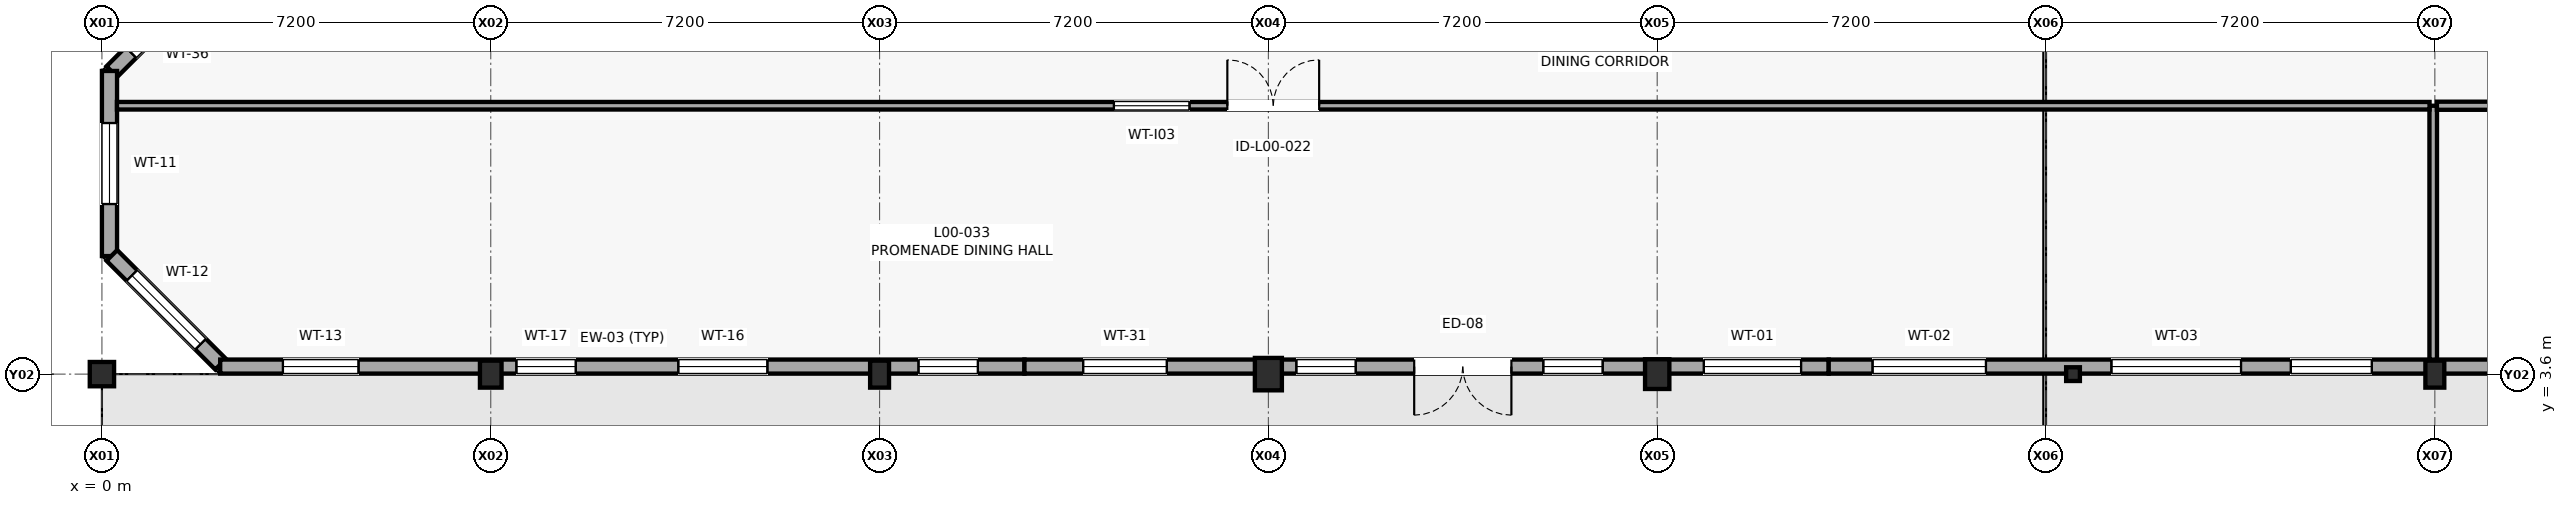
"""IFC4 building model, lengths in metres.
Left out: names, types, materials, properties, quantities, classifications, styles, units other than length and angle.
Written with IfcOpenShell. Run it as: python <this file> out.ifc"""

import sys

from ifc_helpers import new_model, si_unit, direction, frame, frame_2d, origin, origin_2d, place, context, subcontext, project, spatial, rectangle, i_section, extrude, element, fill, save


model = new_model("IFC4")
c1 = context("Model", 3, precision=1e-05, world=origin(), true_north=direction((0.0, 1.0)))
c2 = subcontext(c1, "Body", "Model", "MODEL_VIEW")
j1 = project(units=[si_unit("LENGTHUNIT", "METRE"), si_unit("PLANEANGLEUNIT", "RADIAN")], contexts=[c1])
p1 = place(None, origin())
s1 = spatial("IfcSite", under=j1, at=p1, CompositionType="ELEMENT")
p2 = place(p1, origin())
s2 = spatial("IfcBuilding", under=s1, at=p2, CompositionType="ELEMENT")
p3 = place(p2, origin())
s3 = spatial("IfcBuildingStorey", under=s2, at=p3, CompositionType="ELEMENT", Elevation=0.0)
p4 = place(p3, frame((0.0, 3.6, 0.0), z_axis=(0.0, 0.0, 1.0), x_axis=(1.0, 0.0, 0.0)))
e1 = element("IfcColumn", 1, at=p4, inside=s3, PredefinedType="COLUMN", context=c2, shape_type="SweptSolid", body=[
    extrude(rectangle(XDim=0.45, YDim=0.45, at=origin_2d()), origin(), (0.0, 0.0, 1.0), 4.2),
])
p5 = place(p3, frame((7.2, 3.6, 0.0), z_axis=(0.0, 0.0, 1.0), x_axis=(1.0, 0.0, 0.0)))
e2 = element("IfcColumn", 2, at=p5, inside=s3, PredefinedType="PILASTER", context=c2, shape_type="SweptSolid", body=[
    extrude(rectangle(XDim=0.4, YDim=0.5, at=origin_2d()), origin(), (0.0, 0.0, 1.0), 4.2),
])
p6 = place(p3, frame((14.4, 3.6, 0.0), z_axis=(0.0, 0.0, 1.0), x_axis=(1.0, 0.0, 0.0)))
e3 = element("IfcColumn", 3, at=p6, inside=s3, PredefinedType="PILASTER", context=c2, shape_type="SweptSolid", body=[
    extrude(rectangle(XDim=0.35, YDim=0.5, at=origin_2d()), origin(), (0.0, 0.0, 1.0), 4.2),
])
p7 = place(p3, frame((21.6, 3.6, 0.0), z_axis=(0.0, 0.0, 1.0), x_axis=(1.0, 0.0, 0.0)))
e4 = element("IfcColumn", 4, at=p7, inside=s3, PredefinedType="PILASTER", context=c2, shape_type="SweptSolid", body=[
    extrude(rectangle(XDim=0.5, YDim=0.6, at=origin_2d()), origin(), (0.0, 0.0, 1.0), 4.2),
])
p8 = place(p3, frame((28.8, 3.6, 0.0), z_axis=(0.0, 0.0, 1.0), x_axis=(1.0, 0.0, 0.0)))
e5 = element("IfcColumn", 5, at=p8, inside=s3, PredefinedType="PILASTER", context=c2, shape_type="SweptSolid", body=[
    extrude(rectangle(XDim=0.45, YDim=0.55, at=origin_2d()), origin(), (0.0, 0.0, 1.0), 4.2),
])
p9 = place(p3, frame((36.5, 3.6, 0.0), z_axis=(0.0, 0.0, 1.0), x_axis=(1.0, 0.0, 0.0)))
e6 = element("IfcColumn", 6, at=p9, inside=s3, PredefinedType="COLUMN", context=c2, shape_type="SweptSolid", body=[
    extrude(i_section(OverallWidth=0.255, OverallDepth=0.254, WebThickness=0.009, FlangeThickness=0.014, FilletRadius=0.013, at=origin_2d()), origin(), (0.0, 0.0, 1.0), 4.2),
])
p10 = place(p3, frame((43.2, 3.6, 0.0), z_axis=(0.0, 0.0, 1.0), x_axis=(1.0, 0.0, 0.0)))
e7 = element("IfcColumn", 7, at=p10, inside=s3, PredefinedType="PILASTER", context=c2, shape_type="SweptSolid", body=[
    extrude(rectangle(XDim=0.35, YDim=0.5, at=origin_2d()), origin(), (0.0, 0.0, 1.0), 4.2),
])
p11 = place(p3, frame((2.198, 11.216, 0.0), z_axis=(0.0, 0.0, 1.0), x_axis=(-0.707063922334, -0.707149637442, 0.0)))
e8 = element("IfcWall", 8, at=p11, inside=s3, PredefinedType="SOLIDWALL", context=c2, shape_type="SweptSolid", body=[
    extrude(rectangle(XDim=2.848, YDim=0.28, at=frame_2d((1.424, 0.0))), origin(), (0.0, 0.0, 1.0), 3.98),
])
p12 = place(p11, frame((0.499, 0.0, 1.05)))
e9 = element("IfcOpeningElement", 9, at=p12, cuts=e8, PredefinedType="OPENING", context=c2, shape_type="SweptSolid", body=[
    extrude(rectangle(XDim=1.85, YDim=1.4, at=frame_2d((0.925, 0.7))), frame((0.0, 0.15, 0.0), z_axis=(0.0, -1.0, 0.0), x_axis=(1.0, 0.0, 0.0)), (0.0, 0.0, 1.0), 0.3),
])
p13 = place(p3, frame((0.14, 9.214, 0.0), z_axis=(0.0, 0.0, 1.0), x_axis=(0.0, -1.0, 0.0)))
e10 = element("IfcWall", 10, at=p13, inside=s3, PredefinedType="SOLIDWALL", context=c2, shape_type="SweptSolid", body=[
    extrude(rectangle(XDim=3.428, YDim=0.28, at=frame_2d((1.714, 0.0))), origin(), (0.0, 0.0, 1.0), 3.98),
])
p14 = place(p13, frame((0.964, 0.0, 0.75)))
e11 = element("IfcOpeningElement", 11, at=p14, cuts=e10, PredefinedType="OPENING", context=c2, shape_type="SweptSolid", body=[
    extrude(rectangle(XDim=1.5, YDim=2.2, at=frame_2d((0.75, 1.1))), frame((0.0, 0.15, 0.0), z_axis=(0.0, -1.0, 0.0), x_axis=(1.0, 0.0, 0.0)), (0.0, 0.0, 1.0), 0.3),
])
p15 = place(p3, frame((0.184, 5.798, 0.0), z_axis=(0.0, 0.0, 1.0), x_axis=(0.707063922334, -0.707149637442, 0.0)))
e12 = element("IfcWall", 12, at=p15, inside=s3, PredefinedType="SOLIDWALL", context=c2, shape_type="SweptSolid", body=[
    extrude(rectangle(XDim=2.848, YDim=0.28, at=frame_2d((1.424, 0.0))), origin(), (0.0, 0.0, 1.0), 3.98),
])
p16 = place(p15, frame((0.524, 0.0, 0.75)))
e13 = element("IfcOpeningElement", 13, at=p16, cuts=e12, PredefinedType="OPENING", context=c2, shape_type="SweptSolid", body=[
    extrude(rectangle(XDim=1.8, YDim=2.25, at=frame_2d((0.9, 1.125))), frame((0.0, 0.15, 0.0), z_axis=(0.0, -1.0, 0.0), x_axis=(1.0, 0.0, 0.0)), (0.0, 0.0, 1.0), 0.3),
])
p17 = place(p3, frame((2.19, 3.74, 0.0), z_axis=(0.0, 0.0, 1.0), x_axis=(1.0, 0.0, 0.0)))
e14 = element("IfcWall", 14, at=p17, inside=s3, PredefinedType="SOLIDWALL", context=c2, shape_type="SweptSolid", body=[
    extrude(rectangle(XDim=14.893, YDim=0.26, at=frame_2d((7.447, 0.0))), origin(), (0.0, 0.0, 1.0), 3.205),
])
p18 = place(p17, frame((1.162, 0.0, 0.665)))
e15 = element("IfcOpeningElement", 15, at=p18, cuts=e14, PredefinedType="OPENING", context=c2, shape_type="SweptSolid", body=[
    extrude(rectangle(XDim=1.4, YDim=2.4, at=frame_2d((0.7, 1.2))), frame((0.0, 0.14, 0.0), z_axis=(0.0, -1.0, 0.0), x_axis=(1.0, 0.0, 0.0)), (0.0, 0.0, 1.0), 0.28),
])
p19 = place(p17, frame((5.485, 0.0, 0.75)))
e16 = element("IfcOpeningElement", 16, at=p19, cuts=e14, PredefinedType="OPENING", context=c2, shape_type="SweptSolid", body=[
    extrude(rectangle(XDim=1.1, YDim=2.1, at=frame_2d((0.55, 1.05))), frame((0.0, 0.14, 0.0), z_axis=(0.0, -1.0, 0.0), x_axis=(1.0, 0.0, 0.0)), (0.0, 0.0, 1.0), 0.28),
])
p20 = place(p17, frame((8.483, 0.0, 0.85)))
e17 = element("IfcOpeningElement", 17, at=p20, cuts=e14, PredefinedType="OPENING", context=c2, shape_type="SweptSolid", body=[
    extrude(rectangle(XDim=1.65, YDim=1.95, at=frame_2d((0.825, 0.975))), frame((0.0, 0.14, 0.0), z_axis=(0.0, -1.0, 0.0), x_axis=(1.0, 0.0, 0.0)), (0.0, 0.0, 1.0), 0.28),
])
p21 = place(p17, frame((12.931, 0.0, 0.75)))
e18 = element("IfcOpeningElement", 18, at=p21, cuts=e14, PredefinedType="OPENING", context=c2, shape_type="SweptSolid", body=[
    extrude(rectangle(XDim=1.1, YDim=2.1, at=frame_2d((0.55, 1.05))), frame((0.0, 0.14, 0.0), z_axis=(0.0, -1.0, 0.0), x_axis=(1.0, 0.0, 0.0)), (0.0, 0.0, 1.0), 0.28),
])
p22 = place(p3, frame((17.083, 3.74, 0.0), z_axis=(0.0, 0.0, 1.0), x_axis=(1.0, 0.0, 0.0)))
e19 = element("IfcWall", 19, at=p22, inside=s3, PredefinedType="SOLIDWALL", context=c2, shape_type="SweptSolid", body=[
    extrude(rectangle(XDim=14.893, YDim=0.26, at=frame_2d((7.447, 0.0))), origin(), (0.0, 0.0, 1.0), 3.205),
])
p23 = place(p22, frame((7.217, 0.0, 0.0)))
e20 = element("IfcOpeningElement", 20, at=p23, cuts=e19, PredefinedType="OPENING", context=c2, shape_type="SweptSolid", body=[
    extrude(rectangle(XDim=1.8, YDim=2.25, at=frame_2d((0.9, 1.125))), frame((0.0, 0.14, 0.0), z_axis=(0.0, -1.0, 0.0), x_axis=(1.0, 0.0, 0.0)), (0.0, 0.0, 1.0), 0.28),
])
p24 = place(p22, frame((1.087, 0.0, 0.85)))
e21 = element("IfcOpeningElement", 21, at=p24, cuts=e19, PredefinedType="OPENING", context=c2, shape_type="SweptSolid", body=[
    extrude(rectangle(XDim=1.55, YDim=1.85, at=frame_2d((0.775, 0.925))), frame((0.0, 0.14, 0.0), z_axis=(0.0, -1.0, 0.0), x_axis=(1.0, 0.0, 0.0)), (0.0, 0.0, 1.0), 0.28),
])
p25 = place(p22, frame((5.035, 0.0, 0.75)))
e22 = element("IfcOpeningElement", 22, at=p25, cuts=e19, PredefinedType="OPENING", context=c2, shape_type="SweptSolid", body=[
    extrude(rectangle(XDim=1.1, YDim=2.1, at=frame_2d((0.55, 1.05))), frame((0.0, 0.14, 0.0), z_axis=(0.0, -1.0, 0.0), x_axis=(1.0, 0.0, 0.0)), (0.0, 0.0, 1.0), 0.28),
])
p26 = place(p22, frame((9.608, 0.0, 0.75)))
e23 = element("IfcOpeningElement", 23, at=p26, cuts=e19, PredefinedType="OPENING", context=c2, shape_type="SweptSolid", body=[
    extrude(rectangle(XDim=1.1, YDim=2.1, at=frame_2d((0.55, 1.05))), frame((0.0, 0.14, 0.0), z_axis=(0.0, -1.0, 0.0), x_axis=(1.0, 0.0, 0.0)), (0.0, 0.0, 1.0), 0.28),
])
p27 = place(p22, frame((12.581, 0.0, 0.85)))
e24 = element("IfcOpeningElement", 24, at=p27, cuts=e19, PredefinedType="OPENING", context=c2, shape_type="SweptSolid", body=[
    extrude(rectangle(XDim=1.8, YDim=1.8, at=frame_2d((0.9, 0.9))), frame((0.0, 0.14, 0.0), z_axis=(0.0, -1.0, 0.0), x_axis=(1.0, 0.0, 0.0)), (0.0, 0.0, 1.0), 0.28),
])
p28 = place(p3, frame((31.976, 3.74, 0.0), z_axis=(0.0, 0.0, 1.0), x_axis=(1.0, 0.0, 0.0)))
e25 = element("IfcWall", 25, at=p28, inside=s3, PredefinedType="SOLIDWALL", context=c2, shape_type="SweptSolid", body=[
    extrude(rectangle(XDim=14.893, YDim=0.26, at=frame_2d((7.446, 0.0))), origin(), (0.0, 0.0, 1.0), 3.105),
])
p29 = place(p28, frame((0.812, 0.0, 0.85)))
e26 = element("IfcOpeningElement", 26, at=p29, cuts=e25, PredefinedType="OPENING", context=c2, shape_type="SweptSolid", body=[
    extrude(rectangle(XDim=2.1, YDim=1.8, at=frame_2d((1.05, 0.9))), frame((0.0, 0.14, 0.0), z_axis=(0.0, -1.0, 0.0), x_axis=(1.0, 0.0, 0.0)), (0.0, 0.0, 1.0), 0.28),
])
p30 = place(p28, frame((5.235, 0.0, 0.85)))
e27 = element("IfcOpeningElement", 27, at=p30, cuts=e25, PredefinedType="OPENING", context=c2, shape_type="SweptSolid", body=[
    extrude(rectangle(XDim=2.4, YDim=1.85, at=frame_2d((1.2, 0.925))), frame((0.0, 0.14, 0.0), z_axis=(0.0, -1.0, 0.0), x_axis=(1.0, 0.0, 0.0)), (0.0, 0.0, 1.0), 0.28),
])
p31 = place(p28, frame((8.558, 0.0, 0.85)))
e28 = element("IfcOpeningElement", 28, at=p31, cuts=e25, PredefinedType="OPENING", context=c2, shape_type="SweptSolid", body=[
    extrude(rectangle(XDim=1.5, YDim=1.65, at=frame_2d((0.75, 0.825))), frame((0.0, 0.14, 0.0), z_axis=(0.0, -1.0, 0.0), x_axis=(1.0, 0.0, 0.0)), (0.0, 0.0, 1.0), 0.28),
])
p32 = place(p28, frame((12.431, 0.0, 0.85)))
e29 = element("IfcOpeningElement", 29, at=p32, cuts=e25, PredefinedType="OPENING", context=c2, shape_type="SweptSolid", body=[
    extrude(rectangle(XDim=1.2, YDim=1.65, at=frame_2d((0.6, 0.825))), frame((0.0, 0.14, 0.0), z_axis=(0.0, -1.0, 0.0), x_axis=(1.0, 0.0, 0.0)), (0.0, 0.0, 1.0), 0.28),
])
p33 = place(p3, frame((43.17, 3.868, 0.0), z_axis=(0.0, 0.0, 1.0), x_axis=(0.0, 1.0, 0.0)))
e30 = element("IfcWall", 30, at=p33, inside=s3, PredefinedType="PARTITIONING", context=c2, shape_type="SweptSolid", body=[
    extrude(rectangle(XDim=4.702, YDim=0.14, at=frame_2d((2.351, 0.0))), origin(), (0.0, 0.0, 1.0), 3.405),
])
p34 = place(p3, frame((43.102, 8.57, 0.0), z_axis=(0.0, 0.0, 1.0), x_axis=(-1.0, 0.0, 0.0)))
e31 = element("IfcWall", 31, at=p34, inside=s3, PredefinedType="PARTITIONING", context=c2, shape_type="SweptSolid", body=[
    extrude(rectangle(XDim=42.824, YDim=0.14, at=frame_2d((21.412, 0.0))), origin(), (0.0, 0.0, 1.0), 3.955),
])
p35 = place(p34, frame((20.562, 0.0, 0.0)))
e32 = element("IfcOpeningElement", 32, at=p35, cuts=e31, PredefinedType="OPENING", context=c2, shape_type="SweptSolid", body=[
    extrude(rectangle(XDim=1.7, YDim=2.35, at=frame_2d((0.85, 1.175))), frame((0.0, 0.08, 0.0), z_axis=(0.0, -1.0, 0.0), x_axis=(1.0, 0.0, 0.0)), (0.0, 0.0, 1.0), 0.16),
])
p36 = place(p34, frame((22.962, 0.0, 1.05)))
e33 = element("IfcOpeningElement", 33, at=p36, cuts=e31, PredefinedType="OPENING", context=c2, shape_type="SweptSolid", body=[
    extrude(rectangle(XDim=1.4, YDim=1.05, at=frame_2d((0.7, 0.525))), frame((0.0, 0.08, 0.0), z_axis=(0.0, -1.0, 0.0), x_axis=(1.0, 0.0, 0.0)), (0.0, 0.0, 1.0), 0.16),
])
p37 = place(p3, frame((68.297, 8.57, 0.0), z_axis=(0.0, 0.0, 1.0), x_axis=(-1.0, 0.0, 0.0)))
e34 = element("IfcWall", 34, at=p37, inside=s3, PredefinedType="PARTITIONING", context=c2, shape_type="SweptSolid", body=[
    extrude(rectangle(XDim=25.059, YDim=0.15, at=frame_2d((12.53, 0.0))), origin(), (0.0, 0.0, 1.0), 3.955),
])
p38 = place(p37, frame((11.829, 0.0, 0.0)))
e35 = element("IfcOpeningElement", 35, at=p38, cuts=e34, PredefinedType="OPENING", context=c2, shape_type="SweptSolid", body=[
    extrude(rectangle(XDim=1.4, YDim=2.2, at=frame_2d((0.7, 1.1))), frame((0.0, 0.085, 0.0), z_axis=(0.0, -1.0, 0.0), x_axis=(1.0, 0.0, 0.0)), (0.0, 0.0, 1.0), 0.17),
])
p39 = place(p23, frame((1.8, 0.0, 0.0), z_axis=(0.0, 0.0, 1.0), x_axis=(-1.0, 0.0, 0.0)))
e36 = element("IfcDoor", 36, at=p39, inside=s3, OperationType="DOUBLE_DOOR_SINGLE_SWING", PredefinedType="DOOR", context=c2, shape_type="SweptSolid", body=[
    extrude(rectangle(XDim=1.8, YDim=2.25, at=frame_2d((0.9, 1.125))), frame((0.0, 0.025, 0.0), z_axis=(0.0, -1.0, 0.0), x_axis=(1.0, 0.0, 0.0)), (0.0, 0.0, 1.0), 0.05),
])
fill(e20, e36)
p40 = place(p12, origin())
e37 = element("IfcWindow", 37, at=p40, inside=s3, PartitioningType="SINGLE_PANEL", PredefinedType="WINDOW", context=c2, shape_type="SweptSolid", body=[
    extrude(rectangle(XDim=1.85, YDim=1.4, at=frame_2d((0.925, 0.7))), frame((0.0, 0.03, 0.0), z_axis=(0.0, -1.0, 0.0), x_axis=(1.0, 0.0, 0.0)), (0.0, 0.0, 1.0), 0.06),
])
fill(e9, e37)
p41 = place(p14, origin())
e38 = element("IfcWindow", 38, at=p41, inside=s3, PartitioningType="SINGLE_PANEL", PredefinedType="WINDOW", context=c2, shape_type="SweptSolid", body=[
    extrude(rectangle(XDim=1.5, YDim=2.2, at=frame_2d((0.75, 1.1))), frame((0.0, 0.03, 0.0), z_axis=(0.0, -1.0, 0.0), x_axis=(1.0, 0.0, 0.0)), (0.0, 0.0, 1.0), 0.06),
])
fill(e11, e38)
p42 = place(p16, origin())
e39 = element("IfcWindow", 39, at=p42, inside=s3, PartitioningType="SINGLE_PANEL", PredefinedType="WINDOW", context=c2, shape_type="SweptSolid", body=[
    extrude(rectangle(XDim=1.8, YDim=2.25, at=frame_2d((0.9, 1.125))), frame((0.0, 0.03, 0.0), z_axis=(0.0, -1.0, 0.0), x_axis=(1.0, 0.0, 0.0)), (0.0, 0.0, 1.0), 0.06),
])
fill(e13, e39)
p43 = place(p18, origin())
e40 = element("IfcWindow", 40, at=p43, inside=s3, PartitioningType="SINGLE_PANEL", PredefinedType="WINDOW", context=c2, shape_type="SweptSolid", body=[
    extrude(rectangle(XDim=1.4, YDim=2.4, at=frame_2d((0.7, 1.2))), frame((0.0, 0.03, 0.0), z_axis=(0.0, -1.0, 0.0), x_axis=(1.0, 0.0, 0.0)), (0.0, 0.0, 1.0), 0.06),
])
fill(e15, e40)
p44 = place(p19, origin())
e41 = element("IfcWindow", 41, at=p44, inside=s3, PartitioningType="SINGLE_PANEL", PredefinedType="WINDOW", context=c2, shape_type="SweptSolid", body=[
    extrude(rectangle(XDim=1.1, YDim=2.1, at=frame_2d((0.55, 1.05))), frame((0.0, 0.03, 0.0), z_axis=(0.0, -1.0, 0.0), x_axis=(1.0, 0.0, 0.0)), (0.0, 0.0, 1.0), 0.06),
])
fill(e16, e41)
p45 = place(p20, origin())
e42 = element("IfcWindow", 42, at=p45, inside=s3, PartitioningType="SINGLE_PANEL", PredefinedType="WINDOW", context=c2, shape_type="SweptSolid", body=[
    extrude(rectangle(XDim=1.65, YDim=1.95, at=frame_2d((0.825, 0.975))), frame((0.0, 0.03, 0.0), z_axis=(0.0, -1.0, 0.0), x_axis=(1.0, 0.0, 0.0)), (0.0, 0.0, 1.0), 0.06),
])
fill(e17, e42)
p46 = place(p21, origin())
e43 = element("IfcWindow", 43, at=p46, inside=s3, PartitioningType="SINGLE_PANEL", PredefinedType="WINDOW", context=c2, shape_type="SweptSolid", body=[
    extrude(rectangle(XDim=1.1, YDim=2.1, at=frame_2d((0.55, 1.05))), frame((0.0, 0.03, 0.0), z_axis=(0.0, -1.0, 0.0), x_axis=(1.0, 0.0, 0.0)), (0.0, 0.0, 1.0), 0.06),
])
fill(e18, e43)
p47 = place(p24, origin())
e44 = element("IfcWindow", 44, at=p47, inside=s3, PartitioningType="SINGLE_PANEL", PredefinedType="WINDOW", context=c2, shape_type="SweptSolid", body=[
    extrude(rectangle(XDim=1.55, YDim=1.85, at=frame_2d((0.775, 0.925))), frame((0.0, 0.03, 0.0), z_axis=(0.0, -1.0, 0.0), x_axis=(1.0, 0.0, 0.0)), (0.0, 0.0, 1.0), 0.06),
])
fill(e21, e44)
p48 = place(p25, origin())
e45 = element("IfcWindow", 45, at=p48, inside=s3, PartitioningType="SINGLE_PANEL", PredefinedType="WINDOW", context=c2, shape_type="SweptSolid", body=[
    extrude(rectangle(XDim=1.1, YDim=2.1, at=frame_2d((0.55, 1.05))), frame((0.0, 0.03, 0.0), z_axis=(0.0, -1.0, 0.0), x_axis=(1.0, 0.0, 0.0)), (0.0, 0.0, 1.0), 0.06),
])
fill(e22, e45)
p49 = place(p26, origin())
e46 = element("IfcWindow", 46, at=p49, inside=s3, PartitioningType="SINGLE_PANEL", PredefinedType="WINDOW", context=c2, shape_type="SweptSolid", body=[
    extrude(rectangle(XDim=1.1, YDim=2.1, at=frame_2d((0.55, 1.05))), frame((0.0, 0.03, 0.0), z_axis=(0.0, -1.0, 0.0), x_axis=(1.0, 0.0, 0.0)), (0.0, 0.0, 1.0), 0.06),
])
fill(e23, e46)
p50 = place(p27, origin())
e47 = element("IfcWindow", 47, at=p50, inside=s3, PartitioningType="SINGLE_PANEL", PredefinedType="WINDOW", context=c2, shape_type="SweptSolid", body=[
    extrude(rectangle(XDim=1.8, YDim=1.8, at=frame_2d((0.9, 0.9))), frame((0.0, 0.03, 0.0), z_axis=(0.0, -1.0, 0.0), x_axis=(1.0, 0.0, 0.0)), (0.0, 0.0, 1.0), 0.06),
])
fill(e24, e47)
p51 = place(p29, origin())
e48 = element("IfcWindow", 48, at=p51, inside=s3, PartitioningType="SINGLE_PANEL", PredefinedType="WINDOW", context=c2, shape_type="SweptSolid", body=[
    extrude(rectangle(XDim=2.1, YDim=1.8, at=frame_2d((1.05, 0.9))), frame((0.0, 0.03, 0.0), z_axis=(0.0, -1.0, 0.0), x_axis=(1.0, 0.0, 0.0)), (0.0, 0.0, 1.0), 0.06),
])
fill(e26, e48)
p52 = place(p30, origin())
e49 = element("IfcWindow", 49, at=p52, inside=s3, PartitioningType="SINGLE_PANEL", PredefinedType="WINDOW", context=c2, shape_type="SweptSolid", body=[
    extrude(rectangle(XDim=2.4, YDim=1.85, at=frame_2d((1.2, 0.925))), frame((0.0, 0.03, 0.0), z_axis=(0.0, -1.0, 0.0), x_axis=(1.0, 0.0, 0.0)), (0.0, 0.0, 1.0), 0.06),
])
fill(e27, e49)
p53 = place(p31, origin())
e50 = element("IfcWindow", 50, at=p53, inside=s3, PartitioningType="SINGLE_PANEL", PredefinedType="WINDOW", context=c2, shape_type="SweptSolid", body=[
    extrude(rectangle(XDim=1.5, YDim=1.65, at=frame_2d((0.75, 0.825))), frame((0.0, 0.03, 0.0), z_axis=(0.0, -1.0, 0.0), x_axis=(1.0, 0.0, 0.0)), (0.0, 0.0, 1.0), 0.06),
])
fill(e28, e50)
p54 = place(p35, frame((1.7, 0.0, 0.0), z_axis=(0.0, 0.0, 1.0), x_axis=(-1.0, 0.0, 0.0)))
e51 = element("IfcDoor", 51, at=p54, inside=s3, OperationType="DOUBLE_DOOR_SINGLE_SWING", PredefinedType="DOOR", context=c2, shape_type="SweptSolid", body=[
    extrude(rectangle(XDim=1.7, YDim=2.35, at=frame_2d((0.85, 1.175))), frame((0.0, 0.025, 0.0), z_axis=(0.0, -1.0, 0.0), x_axis=(1.0, 0.0, 0.0)), (0.0, 0.0, 1.0), 0.05),
])
fill(e32, e51)
p55 = place(p36, origin())
e52 = element("IfcWindow", 52, at=p55, inside=s3, PartitioningType="SINGLE_PANEL", PredefinedType="WINDOW", context=c2, shape_type="SweptSolid", body=[
    extrude(rectangle(XDim=1.4, YDim=1.05, at=frame_2d((0.7, 0.525))), frame((0.0, 0.03, 0.0), z_axis=(0.0, -1.0, 0.0), x_axis=(1.0, 0.0, 0.0)), (0.0, 0.0, 1.0), 0.06),
])
fill(e33, e52)
save(model, sys.argv[1])
